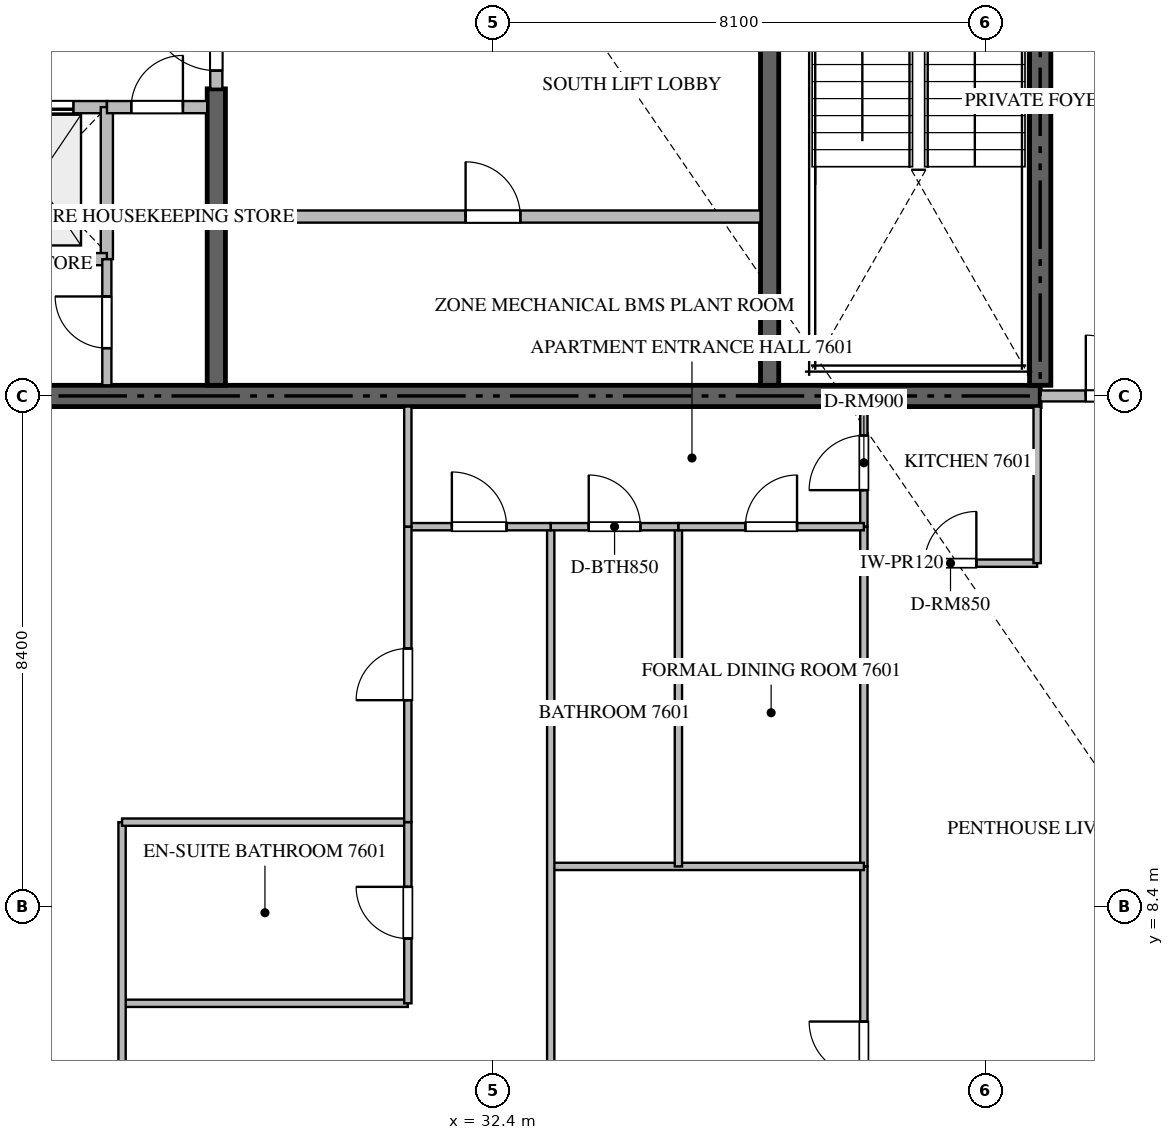
"""IFC4 building model, lengths in metres.
Left out: names, types, materials, properties, quantities, classifications, styles, units other than length and angle.
Written with IfcOpenShell. Run it as: python <this file> out.ifc"""

import sys

from ifc_helpers import new_model, si_unit, direction, frame, frame_2d, origin, place, context, subcontext, project, spatial, rectangle, extrude, source, transform, mapped, element, fill, save


model = new_model("IFC4")
c1 = context("Model", 3, precision=1e-05, world=origin(), true_north=direction((0.0, 1.0)))
c2 = subcontext(c1, "Body", "Model", "MODEL_VIEW")
j1 = project(units=[si_unit("LENGTHUNIT", "METRE"), si_unit("PLANEANGLEUNIT", "RADIAN")], contexts=[c1])
p1 = place(None, origin())
s1 = spatial("IfcSite", under=j1, at=p1, CompositionType="ELEMENT")
p2 = place(p1, origin())
s2 = spatial("IfcBuilding", under=s1, at=p2, CompositionType="ELEMENT")
p3 = place(p2, frame((0.0, 0.0, 305.6)))
s3 = spatial("IfcBuildingStorey", under=s2, at=p3, CompositionType="ELEMENT", Elevation=305.6)
p4 = place(p3, frame((23.4, 16.8, -0.26), z_axis=(0.0, 0.0, 1.0), x_axis=(1.0, 0.0, 0.0)))
e1 = element("IfcWall", 1, at=p4, inside=s3, PredefinedType="SHEAR", context=c2, shape_type="SweptSolid", body=[
    extrude(rectangle(XDim=18.0, YDim=0.35, at=frame_2d((9.0, 0.0))), origin(), (0.0, 0.0, 1.0), 4.048),
])
p5 = place(p3, frame((41.4, 16.975, -0.26), z_axis=(0.0, 0.0, 1.0), x_axis=(0.0, 1.0, 0.0)))
e2 = element("IfcWall", 2, at=p5, inside=s3, PredefinedType="SHEAR", context=c2, shape_type="SweptSolid", body=[
    extrude(rectangle(XDim=8.375, YDim=0.35, at=frame_2d((4.188, 0.0))), origin(), (0.0, 0.0, 1.0), 4.048),
])
p6 = place(p3, frame((27.85, 16.975, -0.26), z_axis=(0.0, 0.0, 1.0), x_axis=(0.0, 1.0, 0.0)))
e3 = element("IfcWall", 3, at=p6, inside=s3, PredefinedType="SHEAR", context=c2, shape_type="SweptSolid", body=[
    extrude(rectangle(XDim=4.875, YDim=0.3, at=frame_2d((2.438, 0.0))), origin(), (0.0, 0.0, 1.0), 4.048),
])
p7 = place(p3, frame((36.95, 16.975, -0.26), z_axis=(0.0, 0.0, 1.0), x_axis=(0.0, 1.0, 0.0)))
e4 = element("IfcWall", 4, at=p7, inside=s3, PredefinedType="SHEAR", context=c2, shape_type="SweptSolid", body=[
    extrude(rectangle(XDim=8.375, YDim=0.3, at=frame_2d((4.188, 0.0))), origin(), (0.0, 0.0, 1.0), 4.048),
])
p8 = place(p3, frame((23.575, 21.55, 0.0), z_axis=(0.0, 0.0, 1.0), x_axis=(1.0, 0.0, 0.0)))
e5 = element("IfcWall", 5, at=p8, inside=s3, PredefinedType="STANDARD", context=c2, shape_type="SweptSolid", body=[
    extrude(rectangle(XDim=2.475, YDim=0.2, at=frame_2d((1.238, 0.0))), origin(), (0.0, 0.0, 1.0), 3.79),
])
p9 = place(p8, frame((0.725, 0.0, 0.0)))
e6 = element("IfcOpeningElement", 6, at=p9, cuts=e5, PredefinedType="OPENING", context=c2, shape_type="SweptSolid", body=[
    extrude(rectangle(XDim=1.2, YDim=2.2, at=frame_2d((0.6, 1.1))), frame((0.0, 0.11, 0.0), z_axis=(0.0, -1.0, 0.0), x_axis=(1.0, 0.0, 0.0)), (0.0, 0.0, 1.0), 0.22),
])
p10 = place(p3, frame((26.05, 19.05, 0.0), z_axis=(0.0, 0.0, 1.0), x_axis=(0.0, 1.0, 0.0)))
e7 = element("IfcWall", 7, at=p10, inside=s3, PredefinedType="STANDARD", context=c2, shape_type="SweptSolid", body=[
    extrude(rectangle(XDim=2.5, YDim=0.2, at=frame_2d((1.25, 0.0))), origin(), (0.0, 0.0, 1.0), 3.79),
])
p11 = place(p3, frame((23.575, 19.05, 0.0), z_axis=(0.0, 0.0, 1.0), x_axis=(1.0, 0.0, 0.0)))
e8 = element("IfcWall", 8, at=p11, inside=s3, PredefinedType="STANDARD", context=c2, shape_type="SweptSolid", body=[
    extrude(rectangle(XDim=2.475, YDim=0.2, at=frame_2d((1.238, 0.0))), origin(), (0.0, 0.0, 1.0), 3.79),
])
p12 = place(p3, frame((26.052, 21.55, 0.0), z_axis=(0.0, 0.0, 1.0), x_axis=(1.0, 0.0, 0.0)))
e9 = element("IfcWall", 9, at=p12, inside=s3, PredefinedType="STANDARD", context=c2, shape_type="SweptSolid", body=[
    extrude(rectangle(XDim=1.648, YDim=0.2, at=frame_2d((0.824, 0.0))), origin(), (0.0, 0.0, 1.0), 3.79),
])
p13 = place(p12, frame((0.399, 0.0, 0.0)))
e10 = element("IfcOpeningElement", 10, at=p13, cuts=e9, PredefinedType="OPENING", context=c2, shape_type="SweptSolid", body=[
    extrude(rectangle(XDim=0.85, YDim=2.1, at=frame_2d((0.425, 1.05))), frame((0.0, 0.11, 0.0), z_axis=(0.0, -1.0, 0.0), x_axis=(1.0, 0.0, 0.0)), (0.0, 0.0, 1.0), 0.22),
])
p14 = place(p3, frame((27.85, 21.852, 0.0), z_axis=(0.0, 0.0, 1.0), x_axis=(0.0, 1.0, 0.0)))
e11 = element("IfcWall", 11, at=p14, inside=s3, PredefinedType="STANDARD", context=c2, shape_type="SweptSolid", body=[
    extrude(rectangle(XDim=1.696, YDim=0.2, at=frame_2d((0.848, 0.0))), origin(), (0.0, 0.0, 1.0), 3.79),
])
p15 = place(p14, frame((0.298, 0.0, 0.0)))
e12 = element("IfcOpeningElement", 12, at=p15, cuts=e11, PredefinedType="OPENING", context=c2, shape_type="SweptSolid", body=[
    extrude(rectangle(XDim=1.1, YDim=2.15, at=frame_2d((0.55, 1.075))), frame((0.0, 0.11, 0.0), z_axis=(0.0, -1.0, 0.0), x_axis=(1.0, 0.0, 0.0)), (0.0, 0.0, 1.0), 0.22),
])
p16 = place(p3, frame((26.05, 16.975, 0.0), z_axis=(0.0, 0.0, 1.0), x_axis=(0.0, 1.0, 0.0)))
e13 = element("IfcWall", 13, at=p16, inside=s3, PredefinedType="PARTITIONING", context=c2, shape_type="SweptSolid", body=[
    extrude(rectangle(XDim=2.073, YDim=0.15, at=frame_2d((1.037, 0.0))), origin(), (0.0, 0.0, 1.0), 3.79),
])
p17 = place(p16, frame((0.611, 0.0, 0.0)))
e14 = element("IfcOpeningElement", 14, at=p17, cuts=e13, PredefinedType="OPENING", context=c2, shape_type="SweptSolid", body=[
    extrude(rectangle(XDim=0.85, YDim=2.1, at=frame_2d((0.425, 1.05))), frame((0.0, 0.085, 0.0), z_axis=(0.0, -1.0, 0.0), x_axis=(1.0, 0.0, 0.0)), (0.0, 0.0, 1.0), 0.17),
])
p18 = place(p3, frame((28.0, 19.75, 0.0), z_axis=(0.0, 0.0, 1.0), x_axis=(1.0, 0.0, 0.0)))
e15 = element("IfcWall", 15, at=p18, inside=s3, PredefinedType="STANDARD", context=c2, shape_type="SweptSolid", body=[
    extrude(rectangle(XDim=8.8, YDim=0.2, at=frame_2d((4.4, 0.0))), origin(), (0.0, 0.0, 1.0), 3.79),
])
p19 = place(p18, frame((3.95, 0.0, 0.0)))
e16 = element("IfcOpeningElement", 16, at=p19, cuts=e15, PredefinedType="OPENING", context=c2, shape_type="SweptSolid", body=[
    extrude(rectangle(XDim=0.9, YDim=2.1, at=frame_2d((0.45, 1.05))), frame((0.0, 0.11, 0.0), z_axis=(0.0, -1.0, 0.0), x_axis=(1.0, 0.0, 0.0)), (0.0, 0.0, 1.0), 0.22),
])
p20 = place(p3, frame((41.402, 16.8, 0.0), z_axis=(0.0, 0.0, 1.0), x_axis=(1.0, 0.0, 0.0)))
e17 = element("IfcWall", 17, at=p20, inside=s3, PredefinedType="PARTITIONING", context=c2, shape_type="SweptSolid", body=[
    extrude(rectangle(XDim=2.496, YDim=0.18, at=frame_2d((1.248, 0.0))), origin(), (0.0, 0.0, 1.0), 3.79),
])
p21 = place(p20, frame((0.748, 0.0, 0.0)))
e18 = element("IfcOpeningElement", 18, at=p21, cuts=e17, PredefinedType="OPENING", context=c2, shape_type="SweptSolid", body=[
    extrude(rectangle(XDim=1.0, YDim=2.15, at=frame_2d((0.5, 1.075))), frame((0.0, 0.1, 0.0), z_axis=(0.0, -1.0, 0.0), x_axis=(1.0, 0.0, 0.0)), (0.0, 0.0, 1.0), 0.2),
])
p22 = place(p3, frame((38.5, 14.05, 0.0), z_axis=(0.0, 0.0, 1.0), x_axis=(1.0, 0.0, 0.0)))
e19 = element("IfcWall", 19, at=p22, inside=s3, PredefinedType="PARTITIONING", context=c2, shape_type="SweptSolid", body=[
    extrude(rectangle(XDim=2.85, YDim=0.12, at=frame_2d((1.425, 0.0))), origin(), (0.0, 0.0, 1.0), 3.512),
])
p23 = place(p22, frame((1.0, 0.0, 0.0)))
e20 = element("IfcOpeningElement", 20, at=p23, cuts=e19, PredefinedType="OPENING", context=c2, shape_type="SweptSolid", body=[
    extrude(rectangle(XDim=0.85, YDim=2.1, at=frame_2d((0.425, 1.05))), frame((0.0, 0.07, 0.0), z_axis=(0.0, -1.0, 0.0), x_axis=(1.0, 0.0, 0.0)), (0.0, 0.0, 1.0), 0.14),
])
p24 = place(p3, frame((41.35, 14.05, 0.0), z_axis=(0.0, 0.0, 1.0), x_axis=(0.0, 1.0, 0.0)))
e21 = element("IfcWall", 21, at=p24, inside=s3, PredefinedType="PARTITIONING", context=c2, shape_type="SweptSolid", body=[
    extrude(rectangle(XDim=2.575, YDim=0.12, at=frame_2d((1.288, 0.0))), origin(), (0.0, 0.0, 1.0), 3.79),
])
p25 = place(p3, frame((38.5, 14.65, 0.0), z_axis=(0.0, 0.0, 1.0), x_axis=(0.0, 1.0, 0.0)))
e22 = element("IfcWall", 22, at=p25, inside=s3, PredefinedType="PARTITIONING", context=c2, shape_type="SweptSolid", body=[
    extrude(rectangle(XDim=1.975, YDim=0.12, at=frame_2d((0.988, 0.0))), origin(), (0.0, 0.0, 1.0), 3.79),
])
p26 = place(p25, frame((0.601, 0.0, 0.0)))
e23 = element("IfcOpeningElement", 23, at=p26, cuts=e22, PredefinedType="OPENING", context=c2, shape_type="SweptSolid", body=[
    extrude(rectangle(XDim=0.9, YDim=2.1, at=frame_2d((0.45, 1.05))), frame((0.0, 0.07, 0.0), z_axis=(0.0, -1.0, 0.0), x_axis=(1.0, 0.0, 0.0)), (0.0, 0.0, 1.0), 0.14),
])
p27 = place(p3, frame((38.5, 2.495, 0.0), z_axis=(0.0, 0.0, 1.0), x_axis=(0.0, 1.0, 0.0)))
e24 = element("IfcWall", 24, at=p27, inside=s3, PredefinedType="PARTITIONING", context=c2, shape_type="SweptSolid", body=[
    extrude(rectangle(XDim=6.568, YDim=0.12, at=frame_2d((3.284, 0.0))), origin(), (0.0, 0.0, 1.0), 3.79),
])
p28 = place(p27, frame((3.117, 0.0, 0.0)))
e25 = element("IfcOpeningElement", 25, at=p28, cuts=e24, PredefinedType="OPENING", context=c2, shape_type="SweptSolid", body=[
    extrude(rectangle(XDim=0.9, YDim=2.1, at=frame_2d((0.45, 1.05))), frame((0.0, 0.07, 0.0), z_axis=(0.0, -1.0, 0.0), x_axis=(1.0, 0.0, 0.0)), (0.0, 0.0, 1.0), 0.14),
])
p29 = place(p3, frame((38.5, 9.065, 0.0), z_axis=(0.0, 0.0, 1.0), x_axis=(0.0, 1.0, 0.0)))
e26 = element("IfcWall", 26, at=p29, inside=s3, PredefinedType="PARTITIONING", context=c2, shape_type="SweptSolid", body=[
    extrude(rectangle(XDim=5.583, YDim=0.12, at=frame_2d((2.792, 0.0))), origin(), (0.0, 0.0, 1.0), 3.79),
])
p30 = place(p3, frame((33.35, 9.063, 0.0), z_axis=(0.0, 0.0, 1.0), x_axis=(1.0, 0.0, 0.0)))
e27 = element("IfcWall", 27, at=p30, inside=s3, PredefinedType="PARTITIONING", context=c2, shape_type="SweptSolid", body=[
    extrude(rectangle(XDim=5.15, YDim=0.12, at=frame_2d((2.575, 0.0))), origin(), (0.0, 0.0, 1.0), 3.79),
])
p31 = place(p3, frame((33.35, 2.495, 0.0), z_axis=(0.0, 0.0, 1.0), x_axis=(0.0, 1.0, 0.0)))
e28 = element("IfcWall", 28, at=p31, inside=s3, PredefinedType="PARTITIONING", context=c2, shape_type="SweptSolid", body=[
    extrude(rectangle(XDim=12.155, YDim=0.12, at=frame_2d((6.077, 0.0))), origin(), (0.0, 0.0, 1.0), 3.79),
])
p32 = place(p3, frame((35.45, 9.063, 0.0), z_axis=(0.0, 0.0, 1.0), x_axis=(0.0, 1.0, 0.0)))
e29 = element("IfcWall", 29, at=p32, inside=s3, PredefinedType="PARTITIONING", context=c2, shape_type="SweptSolid", body=[
    extrude(rectangle(XDim=5.587, YDim=0.12, at=frame_2d((2.793, 0.0))), origin(), (0.0, 0.0, 1.0), 3.79),
])
p33 = place(p3, frame((33.35, 14.65, 0.0), z_axis=(0.0, 0.0, 1.0), x_axis=(1.0, 0.0, 0.0)))
e30 = element("IfcWall", 30, at=p33, inside=s3, PredefinedType="PARTITIONING", context=c2, shape_type="SweptSolid", body=[
    extrude(rectangle(XDim=2.1, YDim=0.12, at=frame_2d((1.05, 0.0))), origin(), (0.0, 0.0, 1.0), 3.79),
])
p34 = place(p33, frame((0.625, 0.0, 0.0)))
e31 = element("IfcOpeningElement", 31, at=p34, cuts=e30, PredefinedType="OPENING", context=c2, shape_type="SweptSolid", body=[
    extrude(rectangle(XDim=0.85, YDim=2.1, at=frame_2d((0.425, 1.05))), frame((0.0, 0.07, 0.0), z_axis=(0.0, -1.0, 0.0), x_axis=(1.0, 0.0, 0.0)), (0.0, 0.0, 1.0), 0.14),
])
p35 = place(p3, frame((35.452, 14.65, 0.0), z_axis=(0.0, 0.0, 1.0), x_axis=(1.0, 0.0, 0.0)))
e32 = element("IfcWall", 32, at=p35, inside=s3, PredefinedType="PARTITIONING", context=c2, shape_type="SweptSolid", body=[
    extrude(rectangle(XDim=3.048, YDim=0.12, at=frame_2d((1.524, 0.0))), origin(), (0.0, 0.0, 1.0), 3.79),
])
p36 = place(p35, frame((1.099, 0.0, 0.0)))
e33 = element("IfcOpeningElement", 33, at=p36, cuts=e32, PredefinedType="OPENING", context=c2, shape_type="SweptSolid", body=[
    extrude(rectangle(XDim=0.85, YDim=2.1, at=frame_2d((0.425, 1.05))), frame((0.0, 0.07, 0.0), z_axis=(0.0, -1.0, 0.0), x_axis=(1.0, 0.0, 0.0)), (0.0, 0.0, 1.0), 0.14),
])
p37 = place(p3, frame((31.0, 14.65, 0.0), z_axis=(0.0, 0.0, 1.0), x_axis=(1.0, 0.0, 0.0)))
e34 = element("IfcWall", 34, at=p37, inside=s3, PredefinedType="PARTITIONING", context=c2, shape_type="SweptSolid", body=[
    extrude(rectangle(XDim=2.348, YDim=0.12, at=frame_2d((1.174, 0.0))), origin(), (0.0, 0.0, 1.0), 3.79),
])
p38 = place(p37, frame((0.724, 0.0, 0.0)))
e35 = element("IfcOpeningElement", 35, at=p38, cuts=e34, PredefinedType="OPENING", context=c2, shape_type="SweptSolid", body=[
    extrude(rectangle(XDim=0.9, YDim=2.1, at=frame_2d((0.45, 1.05))), frame((0.0, 0.07, 0.0), z_axis=(0.0, -1.0, 0.0), x_axis=(1.0, 0.0, 0.0)), (0.0, 0.0, 1.0), 0.14),
])
p39 = place(p3, frame((26.3, 6.812, 0.0), z_axis=(0.0, 0.0, 1.0), x_axis=(1.0, 0.0, 0.0)))
e36 = element("IfcWall", 36, at=p39, inside=s3, PredefinedType="PARTITIONING", context=c2, shape_type="SweptSolid", body=[
    extrude(rectangle(XDim=4.7, YDim=0.12, at=frame_2d((2.35, 0.0))), origin(), (0.0, 0.0, 1.0), 3.79),
])
p40 = place(p3, frame((26.3, 2.495, 0.0), z_axis=(0.0, 0.0, 1.0), x_axis=(0.0, 1.0, 0.0)))
e37 = element("IfcWall", 37, at=p40, inside=s3, PredefinedType="PARTITIONING", context=c2, shape_type="SweptSolid", body=[
    extrude(rectangle(XDim=7.296, YDim=0.12, at=frame_2d((3.648, 0.0))), origin(), (0.0, 0.0, 1.0), 3.79),
])
p41 = place(p3, frame((26.3, 9.791, 0.0), z_axis=(0.0, 0.0, 1.0), x_axis=(1.0, 0.0, 0.0)))
e38 = element("IfcWall", 38, at=p41, inside=s3, PredefinedType="PARTITIONING", context=c2, shape_type="SweptSolid", body=[
    extrude(rectangle(XDim=4.7, YDim=0.12, at=frame_2d((2.35, 0.0))), origin(), (0.0, 0.0, 1.0), 3.79),
])
p42 = place(p3, frame((31.0, 6.812, 0.0), z_axis=(0.0, 0.0, 1.0), x_axis=(0.0, 1.0, 0.0)))
e39 = element("IfcWall", 39, at=p42, inside=s3, PredefinedType="PARTITIONING", context=c2, shape_type="SweptSolid", body=[
    extrude(rectangle(XDim=2.979, YDim=0.12, at=frame_2d((1.49, 0.0))), origin(), (0.0, 0.0, 1.0), 3.79),
])
p43 = place(p42, frame((1.065, 0.0, 0.0)))
e40 = element("IfcOpeningElement", 40, at=p43, cuts=e39, PredefinedType="OPENING", context=c2, shape_type="SweptSolid", body=[
    extrude(rectangle(XDim=0.85, YDim=2.1, at=frame_2d((0.425, 1.05))), frame((0.0, 0.07, 0.0), z_axis=(0.0, -1.0, 0.0), x_axis=(1.0, 0.0, 0.0)), (0.0, 0.0, 1.0), 0.14),
])
p44 = place(p3, frame((31.0, 9.793, 0.0), z_axis=(0.0, 0.0, 1.0), x_axis=(0.0, 1.0, 0.0)))
e41 = element("IfcWall", 41, at=p44, inside=s3, PredefinedType="PARTITIONING", context=c2, shape_type="SweptSolid", body=[
    extrude(rectangle(XDim=4.857, YDim=0.12, at=frame_2d((2.428, 0.0))), origin(), (0.0, 0.0, 1.0), 3.79),
])
p45 = place(p44, frame((2.004, 0.0, 0.0)))
e42 = element("IfcOpeningElement", 42, at=p45, cuts=e41, PredefinedType="OPENING", context=c2, shape_type="SweptSolid", body=[
    extrude(rectangle(XDim=0.85, YDim=2.1, at=frame_2d((0.425, 1.05))), frame((0.0, 0.07, 0.0), z_axis=(0.0, -1.0, 0.0), x_axis=(1.0, 0.0, 0.0)), (0.0, 0.0, 1.0), 0.14),
])
p46 = place(p3, frame((31.0, 14.652, 0.0), z_axis=(0.0, 0.0, 1.0), x_axis=(0.0, 1.0, 0.0)))
e43 = element("IfcWall", 43, at=p46, inside=s3, PredefinedType="PARTITIONING", context=c2, shape_type="SweptSolid", body=[
    extrude(rectangle(XDim=1.973, YDim=0.12, at=frame_2d((0.986, 0.0))), origin(), (0.0, 0.0, 1.0), 3.79),
])
m1 = source(origin(), c2, "Body", "SweptSolid", [
    extrude(rectangle(XDim=1.2, YDim=2.2, at=frame_2d((0.6, 1.1))), frame((0.0, 0.025, 0.0), z_axis=(0.0, -1.0, 0.0), x_axis=(1.0, 0.0, 0.0)), (0.0, 0.0, 1.0), 0.05),
])
p47 = place(p9, origin())
e44 = element("IfcDoor", 44, at=p47, inside=s3, OperationType="DOUBLE_DOOR_SLIDING", PredefinedType="DOOR", context=c2, shape_type="MappedRepresentation", body=[
    mapped(m1, transform((0.0, 0.0, 0.0), scale=1.0)),
])
fill(e6, e44)
m2 = source(origin(), c2, "Body", "SweptSolid", [
    extrude(rectangle(XDim=0.85, YDim=2.1, at=frame_2d((0.425, 1.05))), frame((0.0, 0.025, 0.0), z_axis=(0.0, -1.0, 0.0), x_axis=(1.0, 0.0, 0.0)), (0.0, 0.0, 1.0), 0.05),
])
p48 = place(p13, origin())
e45 = element("IfcDoor", 45, at=p48, inside=s3, OperationType="SINGLE_SWING_RIGHT", PredefinedType="DOOR", context=c2, shape_type="MappedRepresentation", body=[
    mapped(m2, transform((0.0, 0.0, 0.0), scale=1.0)),
])
fill(e10, e45)
m3 = source(origin(), c2, "Body", "SweptSolid", [
    extrude(rectangle(XDim=1.1, YDim=2.15, at=frame_2d((0.55, 1.075))), frame((0.0, 0.025, 0.0), z_axis=(0.0, -1.0, 0.0), x_axis=(1.0, 0.0, 0.0)), (0.0, 0.0, 1.0), 0.05),
])
p49 = place(p15, origin())
e46 = element("IfcDoor", 46, at=p49, inside=s3, OperationType="SINGLE_SWING_RIGHT", PredefinedType="DOOR", context=c2, shape_type="MappedRepresentation", body=[
    mapped(m3, transform((0.0, 0.0, 0.0), scale=1.0)),
])
fill(e12, e46)
p50 = place(p17, origin())
e47 = element("IfcDoor", 47, at=p50, inside=s3, OperationType="SINGLE_SWING_RIGHT", PredefinedType="DOOR", context=c2, shape_type="MappedRepresentation", body=[
    mapped(m2, transform((0.0, 0.0, 0.0), scale=1.0)),
])
fill(e14, e47)
m4 = source(origin(), c2, "Body", "SweptSolid", [
    extrude(rectangle(XDim=0.9, YDim=2.1, at=frame_2d((0.45, 1.05))), frame((0.0, 0.025, 0.0), z_axis=(0.0, -1.0, 0.0), x_axis=(1.0, 0.0, 0.0)), (0.0, 0.0, 1.0), 0.05),
])
p51 = place(p19, origin())
e48 = element("IfcDoor", 48, at=p51, inside=s3, OperationType="SINGLE_SWING_LEFT", PredefinedType="DOOR", context=c2, shape_type="MappedRepresentation", body=[
    mapped(m4, transform((0.0, 0.0, 0.0), scale=1.0)),
])
fill(e16, e48)
m5 = source(origin(), c2, "Body", "SweptSolid", [
    extrude(rectangle(XDim=1.0, YDim=2.15, at=frame_2d((0.5, 1.075))), frame((0.0, 0.025, 0.0), z_axis=(0.0, -1.0, 0.0), x_axis=(1.0, 0.0, 0.0)), (0.0, 0.0, 1.0), 0.05),
])
p52 = place(p21, origin())
e49 = element("IfcDoor", 49, at=p52, inside=s3, OperationType="SINGLE_SWING_LEFT", PredefinedType="DOOR", context=c2, shape_type="MappedRepresentation", body=[
    mapped(m5, transform((0.0, 0.0, 0.0), scale=1.0)),
])
fill(e18, e49)
p53 = place(p23, origin())
e50 = element("IfcDoor", 50, at=p53, inside=s3, OperationType="SINGLE_SWING_RIGHT", PredefinedType="DOOR", context=c2, shape_type="MappedRepresentation", body=[
    mapped(m2, transform((0.0, 0.0, 0.0), scale=1.0)),
])
fill(e20, e50)
p54 = place(p26, origin())
e51 = element("IfcDoor", 51, at=p54, inside=s3, OperationType="SINGLE_SWING_LEFT", PredefinedType="DOOR", context=c2, shape_type="MappedRepresentation", body=[
    mapped(m4, transform((0.0, 0.0, 0.0), scale=1.0)),
])
fill(e23, e51)
p55 = place(p28, origin())
e52 = element("IfcDoor", 52, at=p55, inside=s3, OperationType="SINGLE_SWING_RIGHT", PredefinedType="DOOR", context=c2, shape_type="MappedRepresentation", body=[
    mapped(m4, transform((0.0, 0.0, 0.0), scale=1.0)),
])
fill(e25, e52)
p56 = place(p34, origin())
e53 = element("IfcDoor", 53, at=p56, inside=s3, OperationType="SINGLE_SWING_LEFT", PredefinedType="DOOR", context=c2, shape_type="MappedRepresentation", body=[
    mapped(m2, transform((0.0, 0.0, 0.0), scale=1.0)),
])
fill(e31, e53)
p57 = place(p36, origin())
e54 = element("IfcDoor", 54, at=p57, inside=s3, OperationType="SINGLE_SWING_RIGHT", PredefinedType="DOOR", context=c2, shape_type="MappedRepresentation", body=[
    mapped(m2, transform((0.0, 0.0, 0.0), scale=1.0)),
])
fill(e33, e54)
p58 = place(p38, origin())
e55 = element("IfcDoor", 55, at=p58, inside=s3, OperationType="SINGLE_SWING_LEFT", PredefinedType="DOOR", context=c2, shape_type="MappedRepresentation", body=[
    mapped(m4, transform((0.0, 0.0, 0.0), scale=1.0)),
])
fill(e35, e55)
p59 = place(p43, origin())
e56 = element("IfcDoor", 56, at=p59, inside=s3, OperationType="SINGLE_SWING_RIGHT", PredefinedType="DOOR", context=c2, shape_type="MappedRepresentation", body=[
    mapped(m2, transform((0.0, 0.0, 0.0), scale=1.0)),
])
fill(e40, e56)
p60 = place(p45, origin())
e57 = element("IfcDoor", 57, at=p60, inside=s3, OperationType="SINGLE_SWING_LEFT", PredefinedType="DOOR", context=c2, shape_type="MappedRepresentation", body=[
    mapped(m2, transform((0.0, 0.0, 0.0), scale=1.0)),
])
fill(e42, e57)
save(model, sys.argv[1])
